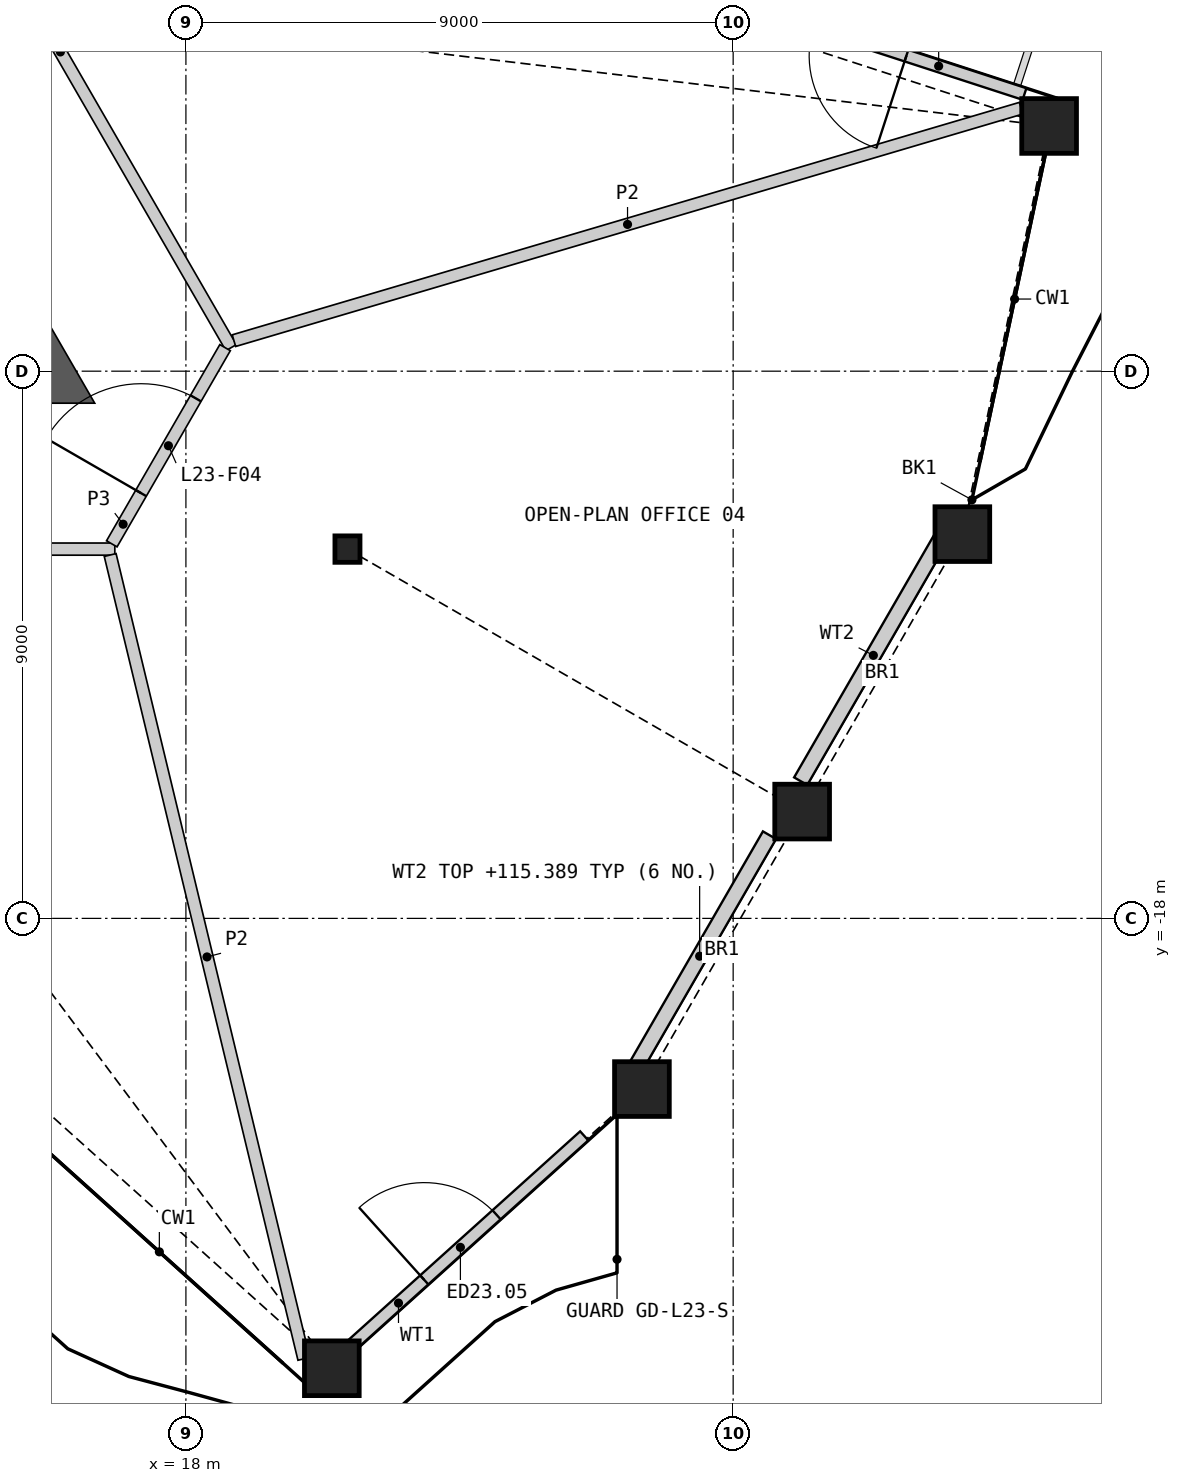
"""IFC4 building model, lengths in metres.
Left out: names, types, materials, properties, quantities, classifications, styles, units other than length and angle.
Written with IfcOpenShell. Run it as: python <this file> out.ifc"""

import sys

from ifc_helpers import new_model, si_unit, direction, frame, frame_2d, origin, origin_2d, place, context, subcontext, project, spatial, polyline, rectangle, hollow_rectangle, i_section, outline, extrude, element, fill, save


model = new_model("IFC4")
c1 = context("Model", 3, precision=1e-05, world=origin(), true_north=direction((0.0, 1.0)))
c2 = subcontext(c1, "Body", "Model", "MODEL_VIEW")
j1 = project(units=[si_unit("LENGTHUNIT", "METRE"), si_unit("PLANEANGLEUNIT", "RADIAN")], contexts=[c1])
p1 = place(None, origin())
s1 = spatial("IfcSite", under=j1, at=p1, CompositionType="ELEMENT")
p2 = place(p1, origin())
s2 = spatial("IfcBuilding", under=s1, at=p2, CompositionType="ELEMENT")
p3 = place(p2, frame((0.0, 0.0, 112.2)))
s3 = spatial("IfcBuildingStorey", under=s2, at=p3, CompositionType="ELEMENT", Elevation=112.2)
for number, where, z_axis, x_axis in (
    (1, (20.4, -25.399, 0.0), (0.0, 0.0, 1.0), (1.0, 0.0, 0.0)),
    (2, (25.5, -20.807, 0.0), (0.0, 0.0, 1.0), (1.0, 0.0, 0.0)),
    (3, (28.135, -16.243, 0.0), (0.0, 0.0, 1.0), (1.0, 0.0, 0.0)),
    (4, (30.769, -11.68, 0.0), (0.0, 0.0, 1.0), (1.0, 0.0, 0.0)),
    (5, (32.196, -4.967, 0.0), (0.0, 0.0, 1.0), (1.0, 0.0, 0.0)),
):
    element("IfcColumn", number, at=place(p3, frame(where, z_axis=z_axis, x_axis=x_axis)), inside=s3, PredefinedType="COLUMN", context=c2, shape_type="SweptSolid", body=[
        extrude(hollow_rectangle(XDim=0.9, YDim=0.9, WallThickness=0.06, at=origin_2d()), origin(), (0.0, 0.0, 1.0), 4.2),
    ])
p4 = place(p3, frame((20.657, -11.926, 0.0), z_axis=(0.0, 0.0, 1.0), x_axis=(1.0, 0.0, 0.0)))
e6 = element("IfcColumn", 6, at=p4, inside=s3, PredefinedType="COLUMN", context=c2, shape_type="SweptSolid", body=[
    extrude(i_section(OverallWidth=0.412, OverallDepth=0.435, WebThickness=0.036, FlangeThickness=0.057, at=origin_2d()), origin(), (0.0, 0.0, 1.0), 4.2),
])
p5 = place(p3, frame((20.478, -25.244, 0.0), z_axis=(0.0, 0.0, 1.0), x_axis=(0.743134641601, 0.669141916526, 0.0)))
e7 = element("IfcWall", 7, at=p5, inside=s3, PredefinedType="SOLIDWALL", context=c2, shape_type="SweptSolid", body=[
    extrude(rectangle(XDim=5.48, YDim=0.2, at=frame_2d((2.74, 0.0))), origin(), (0.0, 0.0, 1.0), 3.189),
])
p6 = place(p5, frame((1.94, 0.0, 0.0)))
e8 = element("IfcOpeningElement", 8, at=p6, cuts=e7, PredefinedType="OPENING", context=c2, shape_type="SweptSolid", body=[
    extrude(rectangle(XDim=1.6, YDim=2.4, at=frame_2d((0.8, 1.2))), frame((0.0, 0.11, 0.0), z_axis=(0.0, -1.0, 0.0), x_axis=(1.0, 0.0, 0.0)), (0.0, 0.0, 1.0), 0.22),
])
p7 = place(p3, frame((25.3, -20.612, 0.0), z_axis=(0.0, 0.0, 1.0), x_axis=(0.500018268964, 0.866014855936, 0.0)))
e9 = element("IfcWall", 9, at=p7, inside=s3, PredefinedType="SOLIDWALL", context=c2, shape_type="SweptSolid", body=[
    extrude(rectangle(XDim=4.596, YDim=0.25, at=frame_2d((2.298, 0.0))), origin(), (0.0, 0.0, 1.0), 3.189),
])
p8 = place(p3, frame((28.111, -15.743, 0.0), z_axis=(0.0, 0.0, 1.0), x_axis=(0.499984810975, 0.866034172995, 0.0)))
e10 = element("IfcWall", 10, at=p8, inside=s3, PredefinedType="SOLIDWALL", context=c2, shape_type="SweptSolid", body=[
    extrude(rectangle(XDim=4.78, YDim=0.25, at=frame_2d((2.39, 0.0))), origin(), (0.0, 0.0, 1.0), 3.189),
])
p9 = place(p3, frame((31.792, -4.441, 0.0), z_axis=(0.0, 0.0, 1.0), x_axis=(-0.951057028782, 0.309015417099, 0.0)))
e11 = element("IfcWall", 11, at=p9, inside=s3, PredefinedType="SOLIDWALL", context=c2, shape_type="SweptSolid", body=[
    extrude(rectangle(XDim=5.938, YDim=0.2, at=frame_2d((2.969, 0.0))), origin(), (0.0, 0.0, 1.0), 3.189),
])
p10 = place(p9, frame((2.042, 0.0, 0.0)))
e12 = element("IfcOpeningElement", 12, at=p10, cuts=e11, PredefinedType="OPENING", context=c2, shape_type="SweptSolid", body=[
    extrude(rectangle(XDim=1.6, YDim=2.4, at=frame_2d((0.8, 1.2))), frame((0.0, 0.11, 0.0), z_axis=(0.0, -1.0, 0.0), x_axis=(1.0, 0.0, 0.0)), (0.0, 0.0, 1.0), 0.22),
])
p11 = place(p3, origin())
e13 = element("IfcWall", 13, at=p11, inside=s3, PredefinedType="SHEAR", context=c2, shape_type="SweptSolid", body=[
    extrude(outline(polyline([(14.941, -8.626), (15.721, -8.176), (16.5, -9.526), (14.941, -9.526), (14.941, -8.626)])), origin(), (0.0, 0.0, 1.0), 3.8),
])
p12 = place(p3, frame((10.556, -11.926, 0.0), z_axis=(0.0, 0.0, 1.0), x_axis=(1.0, 0.0, 0.0)))
e14 = element("IfcWall", 14, at=p12, inside=s3, PredefinedType="PARTITIONING", context=c2, shape_type="SweptSolid", body=[
    extrude(rectangle(XDim=6.275, YDim=0.2, at=frame_2d((3.137, 0.0))), origin(), (0.0, 0.0, 1.0), 3.8),
])
p13 = place(p12, frame((2.187, 0.0, 0.0)))
e15 = element("IfcOpeningElement", 15, at=p13, cuts=e14, PredefinedType="OPENING", context=c2, shape_type="SweptSolid", body=[
    extrude(rectangle(XDim=1.8, YDim=2.1, at=frame_2d((0.9, 1.05))), frame((0.0, 0.11, 0.0), z_axis=(0.0, -1.0, 0.0), x_axis=(1.0, 0.0, 0.0)), (0.0, 0.0, 1.0), 0.22),
])
p14 = place(p3, frame((15.624, -3.209, 0.0), z_axis=(0.0, 0.0, 1.0), x_axis=(0.499997920671, -0.866026604282, 0.0)))
e16 = element("IfcWall", 16, at=p14, inside=s3, PredefinedType="PARTITIONING", context=c2, shape_type="SweptSolid", body=[
    extrude(rectangle(XDim=6.24, YDim=0.2, at=frame_2d((3.12, 0.0))), origin(), (0.0, 0.0, 1.0), 3.8),
])
p15 = place(p3, frame((16.781, -11.84, 0.0), z_axis=(0.0, 0.0, 1.0), x_axis=(0.499958791762, 0.866049194065, 0.0)))
e17 = element("IfcWall", 17, at=p15, inside=s3, PredefinedType="PARTITIONING", context=c2, shape_type="SweptSolid", body=[
    extrude(rectangle(XDim=3.726, YDim=0.2, at=frame_2d((1.863, 0.0))), origin(), (0.0, 0.0, 1.0), 3.8),
])
p16 = place(p15, frame((0.963, 0.0, 0.0)))
e18 = element("IfcOpeningElement", 18, at=p16, cuts=e17, PredefinedType="OPENING", context=c2, shape_type="SweptSolid", body=[
    extrude(rectangle(XDim=1.8, YDim=2.1, at=frame_2d((0.9, 1.05))), frame((0.0, 0.11, 0.0), z_axis=(0.0, -1.0, 0.0), x_axis=(1.0, 0.0, 0.0)), (0.0, 0.0, 1.0), 0.22),
])
p17 = place(p3, frame((16.754, -12.023, 0.0), z_axis=(0.0, 0.0, 1.0), x_axis=(0.234226353532, -0.972182089586, 0.0)))
e19 = element("IfcWall", 19, at=p17, inside=s3, PredefinedType="PARTITIONING", context=c2, shape_type="SweptSolid", body=[
    extrude(rectangle(XDim=13.599, YDim=0.2, at=frame_2d((6.8, 0.0))), origin(), (0.0, 0.0, 1.0), 2.885),
])
p18 = place(p3, frame((18.79, -8.498, 0.0), z_axis=(0.0, 0.0, 1.0), x_axis=(0.959053889024, 0.283223653581, 0.0)))
e20 = element("IfcWall", 20, at=p18, inside=s3, PredefinedType="PARTITIONING", context=c2, shape_type="SweptSolid", body=[
    extrude(rectangle(XDim=13.499, YDim=0.2, at=frame_2d((6.75, 0.0))), origin(), (0.0, 0.0, 1.0), 2.885),
])
p19 = place(p6, origin())
e21 = element("IfcDoor", 21, at=p19, inside=s3, OperationType="DOUBLE_DOOR_SINGLE_SWING", PredefinedType="DOOR", context=c2, shape_type="SweptSolid", body=[
    extrude(rectangle(XDim=1.6, YDim=2.4, at=frame_2d((0.8, 1.2))), frame((0.0, 0.025, 0.0), z_axis=(0.0, -1.0, 0.0), x_axis=(1.0, 0.0, 0.0)), (0.0, 0.0, 1.0), 0.05),
])
fill(e8, e21)
p20 = place(p10, origin())
e22 = element("IfcDoor", 22, at=p20, inside=s3, OperationType="DOUBLE_DOOR_SINGLE_SWING", PredefinedType="DOOR", context=c2, shape_type="SweptSolid", body=[
    extrude(rectangle(XDim=1.6, YDim=2.4, at=frame_2d((0.8, 1.2))), frame((0.0, 0.025, 0.0), z_axis=(0.0, -1.0, 0.0), x_axis=(1.0, 0.0, 0.0)), (0.0, 0.0, 1.0), 0.05),
])
fill(e12, e22)
p21 = place(p16, origin())
e23 = element("IfcDoor", 23, at=p21, inside=s3, OperationType="DOUBLE_DOOR_SINGLE_SWING", PredefinedType="DOOR", context=c2, shape_type="SweptSolid", body=[
    extrude(rectangle(XDim=1.8, YDim=2.1, at=frame_2d((0.9, 1.05))), frame((0.0, 0.025, 0.0), z_axis=(0.0, -1.0, 0.0), x_axis=(1.0, 0.0, 0.0)), (0.0, 0.0, 1.0), 0.05),
])
fill(e18, e23)
save(model, sys.argv[1])
